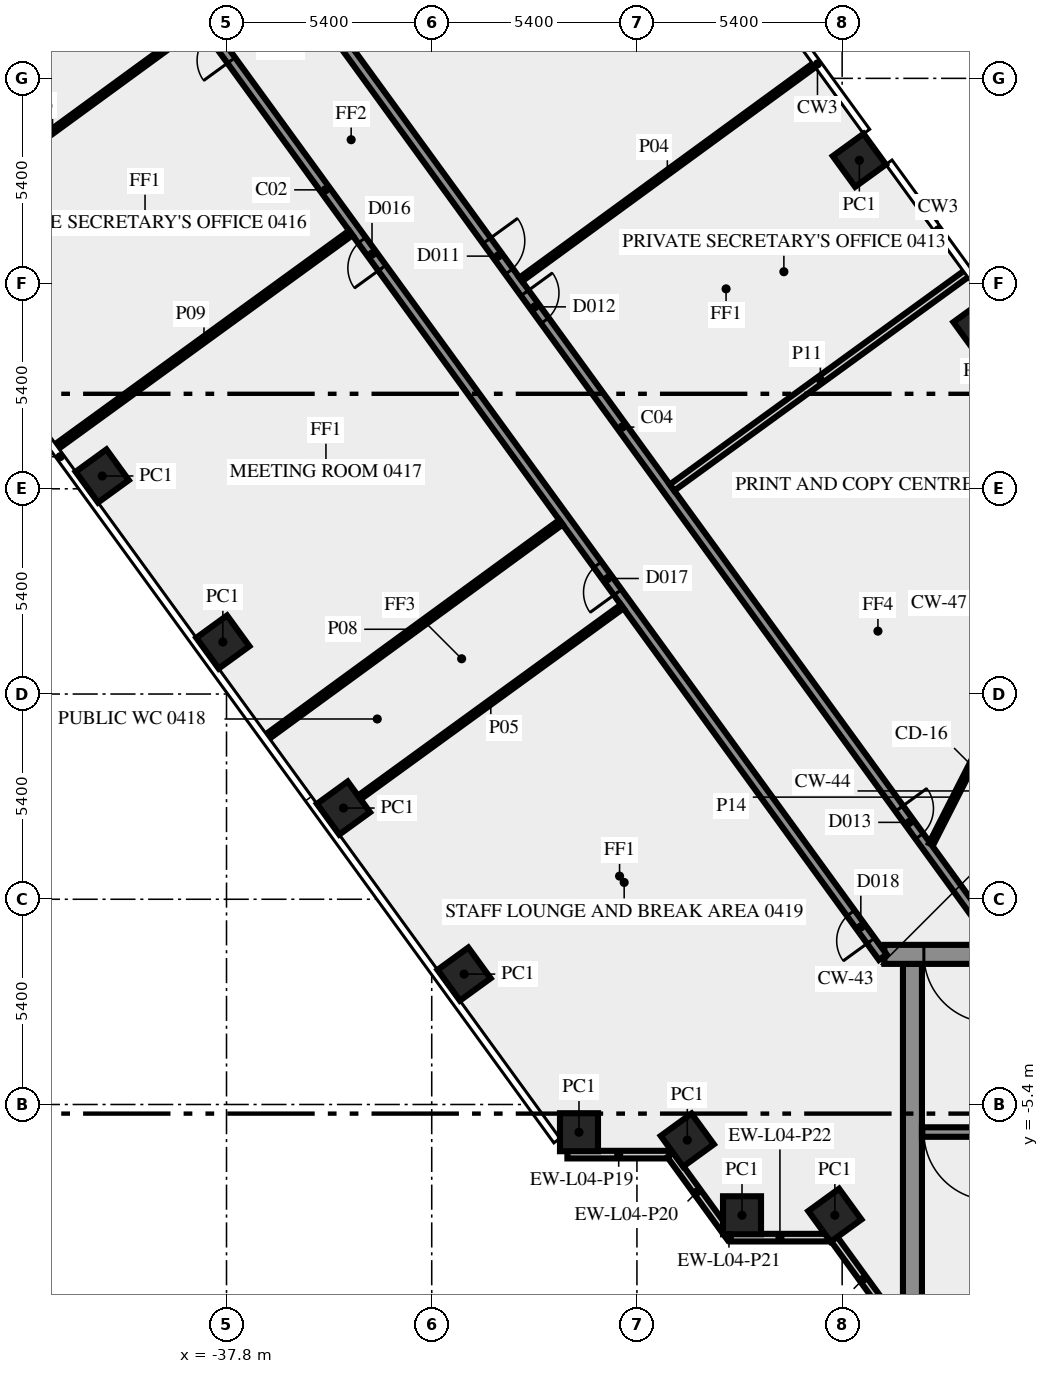
"""IFC4 building model, lengths in metres.
Left out: names, types, materials, properties, quantities, classifications, styles, units other than length and angle.
Written with IfcOpenShell. Run it as: python <this file> out.ifc"""

import sys

from ifc_helpers import new_model, si_unit, direction, frame, frame_2d, origin, origin_2d, place, context, subcontext, project, spatial, rectangle, extrude, element, fill, save


model = new_model("IFC4")
c1 = context("Model", 3, precision=1e-05, world=origin(), true_north=direction((0.0, 1.0)))
c2 = subcontext(c1, "Body", "Model", "MODEL_VIEW")
j1 = project(units=[si_unit("LENGTHUNIT", "METRE"), si_unit("PLANEANGLEUNIT", "RADIAN")], contexts=[c1])
p1 = place(None, origin())
s1 = spatial("IfcSite", under=j1, at=p1, CompositionType="ELEMENT")
p2 = place(p1, origin())
s2 = spatial("IfcBuilding", under=s1, at=p2, CompositionType="ELEMENT")
p3 = place(p2, frame((0.0, 0.0, 20.5)))
s3 = spatial("IfcBuildingStorey", under=s2, at=p3, CompositionType="ELEMENT", Elevation=20.5)
for number, where, z_axis, x_axis in (
    (1, (-17.974, 15.075, 0.0), (0.0, 0.0, 1.0), (-0.588, 0.809, 0.0)),
    (2, (-21.147, 19.444, 0.0), (0.0, 0.0, 1.0), (-0.588, 0.809, 0.0)),
    (3, (-41.07, 11.137, 0.0), (0.0, 0.0, 1.0), (0.588, -0.809, 0.0)),
    (4, (-37.896, 6.769, 0.0), (0.0, 0.0, 1.0), (0.588, -0.809, 0.0)),
    (5, (-34.722, 2.4, 0.0), (0.0, 0.0, 1.0), (0.588, -0.809, 0.0)),
    (6, (-31.548, -1.969, 0.0), (0.0, 0.0, 1.0), (0.588, -0.809, 0.0)),
    (7, (-28.525, -6.13, 0.0), (0.0, 0.0, 1.0), (1.0, 0.0, 0.0)),
    (8, (-25.674, -6.337, 0.0), (0.0, 0.0, 1.0), (0.588, -0.809, 0.0)),
    (9, (-24.235, -8.315, 0.0), (0.0, 0.0, 1.0), (1.0, 0.0, 0.0)),
    (10, (-21.792, -8.315, 0.0), (0.0, 0.0, 1.0), (0.588, -0.809, 0.0)),
):
    element("IfcColumn", number, at=place(p3, frame(where, z_axis=z_axis, x_axis=x_axis)), inside=s3, PredefinedType="COLUMN", context=c2, shape_type="SweptSolid", body=[
        extrude(rectangle(XDim=1.0, YDim=1.0, at=origin_2d()), origin(), (0.0, 0.0, 1.0), 3.9),
    ])
p4 = place(p3, frame((-28.83, -6.719, 0.0), z_axis=(0.0, 0.0, 1.0), x_axis=(1.0, 0.0, 0.0)))
e11 = element("IfcWall", 11, at=p4, inside=s3, PredefinedType="SOLIDWALL", context=c2, shape_type="SweptSolid", body=[
    extrude(rectangle(XDim=2.7, YDim=0.2, at=frame_2d((1.35, 0.0))), origin(), (0.0, 0.0, 1.0), 3.9),
])
p5 = place(p3, frame((-26.12, -6.724, 0.0), z_axis=(0.0, 0.0, 1.0), x_axis=(0.587706476352, -0.809074222587, 0.0)))
e12 = element("IfcWall", 12, at=p5, inside=s3, PredefinedType="SOLIDWALL", context=c2, shape_type="SweptSolid", body=[
    extrude(rectangle(XDim=2.403, YDim=0.2, at=frame_2d((1.202, 0.0))), origin(), (0.0, 0.0, 1.0), 3.9),
])
p6 = place(p3, frame((-24.624, -8.784, 0.0), z_axis=(0.0, 0.0, 1.0), x_axis=(0.586760218966, -0.809760733451, 0.0)))
e13 = element("IfcWall", 13, at=p6, inside=s3, PredefinedType="SOLIDWALL", context=c2, shape_type="SweptSolid", body=[
    extrude(rectangle(XDim=0.154, YDim=0.2, at=frame_2d((0.077, 0.0))), origin(), (0.0, 0.0, 1.0), 3.9),
])
p7 = place(p3, frame((-24.531, -8.904, 0.0), z_axis=(0.0, 0.0, 1.0), x_axis=(1.0, 0.0, 0.0)))
e14 = element("IfcWall", 14, at=p7, inside=s3, PredefinedType="SOLIDWALL", context=c2, shape_type="SweptSolid", body=[
    extrude(rectangle(XDim=2.587, YDim=0.2, at=frame_2d((1.294, 0.0))), origin(), (0.0, 0.0, 1.0), 3.9),
])
p8 = place(p3, frame((-21.833, -8.909, 0.0), z_axis=(0.0, 0.0, 1.0), x_axis=(0.587766567315, -0.809030569476, 0.0)))
e15 = element("IfcWall", 15, at=p8, inside=s3, PredefinedType="SOLIDWALL", context=c2, shape_type="SweptSolid", body=[
    extrude(rectangle(XDim=2.688, YDim=0.2, at=frame_2d((1.344, 0.0))), origin(), (0.0, 0.0, 1.0), 3.9),
])
p9 = place(p3, frame((-19.75, -10.5, 0.0), z_axis=(0.0, 0.0, 1.0), x_axis=(0.0, 1.0, 0.0)))
e16 = element("IfcWall", 16, at=p9, inside=s3, PredefinedType="SHEAR", context=c2, shape_type="SweptSolid", body=[
    extrude(rectangle(XDim=8.8, YDim=0.5, at=frame_2d((4.4, 0.0))), origin(), (0.0, 0.0, 1.0), 3.9),
])
p10 = place(p3, frame((-11.45, -6.125, 0.0), z_axis=(0.0, 0.0, 1.0), x_axis=(-1.0, 0.0, 0.0)))
e17 = element("IfcWall", 17, at=p10, inside=s3, PredefinedType="SHEAR", context=c2, shape_type="SweptSolid", body=[
    extrude(rectangle(XDim=8.05, YDim=0.25, at=frame_2d((4.025, 0.0))), origin(), (0.0, 0.0, 1.0), 3.9),
])
p11 = place(p10, frame((6.2, 0.0, 0.0)))
e18 = element("IfcOpeningElement", 18, at=p11, cuts=e17, PredefinedType="OPENING", context=c2, shape_type="SweptSolid", body=[
    extrude(rectangle(XDim=1.8, YDim=2.1, at=frame_2d((0.9, 1.05))), frame((0.0, 0.135, 0.0), z_axis=(0.0, -1.0, 0.0), x_axis=(1.0, 0.0, 0.0)), (0.0, 0.0, 1.0), 0.27),
])
p12 = place(p3, frame((20.49, -1.45, 0.0), z_axis=(0.0, 0.0, 1.0), x_axis=(-1.0, 0.0, 0.0)))
e19 = element("IfcWall", 19, at=p12, inside=s3, PredefinedType="SHEAR", context=c2, shape_type="SweptSolid", body=[
    extrude(rectangle(XDim=40.98, YDim=0.5, at=frame_2d((20.49, 0.0))), origin(), (0.0, 0.0, 1.0), 3.9),
])
p13 = place(p12, frame((38.14, 0.0, 0.0)))
e20 = element("IfcOpeningElement", 20, at=p13, cuts=e19, PredefinedType="OPENING", context=c2, shape_type="SweptSolid", body=[
    extrude(rectangle(XDim=1.8, YDim=2.1, at=frame_2d((0.9, 1.05))), frame((0.0, 0.26, 0.0), z_axis=(0.0, -1.0, 0.0), x_axis=(1.0, 0.0, 0.0)), (0.0, 0.0, 1.0), 0.52),
])
p14 = place(p12, frame((36.728, 0.0, 0.0)))
e21 = element("IfcOpeningElement", 21, at=p14, cuts=e19, PredefinedType="OPENING", context=c2, shape_type="SweptSolid", body=[
    extrude(rectangle(XDim=0.8, YDim=2.1, at=frame_2d((0.4, 1.05))), frame((0.0, 0.26, 0.0), z_axis=(0.0, -1.0, 0.0), x_axis=(1.0, 0.0, 0.0)), (0.0, 0.0, 1.0), 0.52),
])
p15 = place(p12, frame((35.153, 0.0, 0.0)))
e22 = element("IfcOpeningElement", 22, at=p15, cuts=e19, PredefinedType="OPENING", context=c2, shape_type="SweptSolid", body=[
    extrude(rectangle(XDim=0.8, YDim=2.1, at=frame_2d((0.4, 1.05))), frame((0.0, 0.26, 0.0), z_axis=(0.0, -1.0, 0.0), x_axis=(1.0, 0.0, 0.0)), (0.0, 0.0, 1.0), 0.52),
])
p16 = place(p12, frame((32.94, 0.0, 0.0)))
e23 = element("IfcOpeningElement", 23, at=p16, cuts=e19, PredefinedType="OPENING", context=c2, shape_type="SweptSolid", body=[
    extrude(rectangle(XDim=0.9, YDim=2.1, at=frame_2d((0.45, 1.05))), frame((0.0, 0.26, 0.0), z_axis=(0.0, -1.0, 0.0), x_axis=(1.0, 0.0, 0.0)), (0.0, 0.0, 1.0), 0.52),
])
p17 = place(p12, frame((19.59, 0.0, 0.0)))
e24 = element("IfcOpeningElement", 24, at=p17, cuts=e19, PredefinedType="OPENING", context=c2, shape_type="SweptSolid", body=[
    extrude(rectangle(XDim=2.0, YDim=2.1, at=frame_2d((1.0, 1.05))), frame((0.0, 0.26, 0.0), z_axis=(0.0, -1.0, 0.0), x_axis=(1.0, 0.0, 0.0)), (0.0, 0.0, 1.0), 0.52),
])
p18 = place(p12, frame((7.14, 0.0, 0.0)))
e25 = element("IfcOpeningElement", 25, at=p18, cuts=e19, PredefinedType="OPENING", context=c2, shape_type="SweptSolid", body=[
    extrude(rectangle(XDim=0.9, YDim=2.1, at=frame_2d((0.45, 1.05))), frame((0.0, 0.26, 0.0), z_axis=(0.0, -1.0, 0.0), x_axis=(1.0, 0.0, 0.0)), (0.0, 0.0, 1.0), 0.52),
])
p19 = place(p12, frame((4.19, 0.0, 0.0)))
e26 = element("IfcOpeningElement", 26, at=p19, cuts=e19, PredefinedType="OPENING", context=c2, shape_type="SweptSolid", body=[
    extrude(rectangle(XDim=0.9, YDim=2.1, at=frame_2d((0.45, 1.05))), frame((0.0, 0.26, 0.0), z_axis=(0.0, -1.0, 0.0), x_axis=(1.0, 0.0, 0.0)), (0.0, 0.0, 1.0), 0.52),
])
p20 = place(p12, frame((1.04, 0.0, 0.0)))
e27 = element("IfcOpeningElement", 27, at=p20, cuts=e19, PredefinedType="OPENING", context=c2, shape_type="SweptSolid", body=[
    extrude(rectangle(XDim=1.8, YDim=2.1, at=frame_2d((0.9, 1.05))), frame((0.0, 0.26, 0.0), z_axis=(0.0, -1.0, 0.0), x_axis=(1.0, 0.0, 0.0)), (0.0, 0.0, 1.0), 0.52),
])
p21 = place(p3, frame((-20.531, -1.523, 0.0), z_axis=(0.0, 0.0, 1.0), x_axis=(-0.587784522481, 0.809017524614, 0.0)))
e28 = element("IfcWall", 28, at=p21, inside=s3, PredefinedType="SOLIDWALL", context=c2, shape_type="SweptSolid", body=[
    extrude(rectangle(XDim=49.912, YDim=0.25, at=frame_2d((24.956, 0.0))), origin(), (0.0, 0.0, 1.0), 3.9),
])
p22 = place(p21, frame((30.765, 0.0, 0.0)))
e29 = element("IfcOpeningElement", 29, at=p22, cuts=e28, PredefinedType="OPENING", context=c2, shape_type="SweptSolid", body=[
    extrude(rectangle(XDim=0.9, YDim=2.1, at=frame_2d((0.45, 1.05))), frame((0.0, 0.135, 0.0), z_axis=(0.0, -1.0, 0.0), x_axis=(1.0, 0.0, 0.0)), (0.0, 0.0, 1.0), 0.27),
])
p23 = place(p21, frame((0.533, 0.0, 0.0)))
e30 = element("IfcOpeningElement", 30, at=p23, cuts=e28, PredefinedType="OPENING", context=c2, shape_type="SweptSolid", body=[
    extrude(rectangle(XDim=0.9, YDim=2.1, at=frame_2d((0.45, 1.05))), frame((0.0, 0.135, 0.0), z_axis=(0.0, -1.0, 0.0), x_axis=(1.0, 0.0, 0.0)), (0.0, 0.0, 1.0), 0.27),
])
p24 = place(p21, frame((22.416, 0.0, 0.0)))
e31 = element("IfcOpeningElement", 31, at=p24, cuts=e28, PredefinedType="OPENING", context=c2, shape_type="SweptSolid", body=[
    extrude(rectangle(XDim=0.9, YDim=2.1, at=frame_2d((0.45, 1.05))), frame((0.0, 0.135, 0.0), z_axis=(0.0, -1.0, 0.0), x_axis=(1.0, 0.0, 0.0)), (0.0, 0.0, 1.0), 0.27),
])
p25 = place(p21, frame((11.866, 0.0, 0.0)))
e32 = element("IfcOpeningElement", 32, at=p25, cuts=e28, PredefinedType="OPENING", context=c2, shape_type="SweptSolid", body=[
    extrude(rectangle(XDim=0.9, YDim=2.1, at=frame_2d((0.45, 1.05))), frame((0.0, 0.135, 0.0), z_axis=(0.0, -1.0, 0.0), x_axis=(1.0, 0.0, 0.0)), (0.0, 0.0, 1.0), 0.27),
])
p26 = place(p21, frame((29.166, 0.0, 0.0)))
e33 = element("IfcOpeningElement", 33, at=p26, cuts=e28, PredefinedType="OPENING", context=c2, shape_type="SweptSolid", body=[
    extrude(rectangle(XDim=0.9, YDim=2.1, at=frame_2d((0.45, 1.05))), frame((0.0, 0.135, 0.0), z_axis=(0.0, -1.0, 0.0), x_axis=(1.0, 0.0, 0.0)), (0.0, 0.0, 1.0), 0.27),
])
p27 = place(p3, frame((-37.232, 25.972, 0.0), z_axis=(0.0, 0.0, 1.0), x_axis=(0.587786323093, -0.809016216391, 0.0)))
e34 = element("IfcWall", 34, at=p27, inside=s3, PredefinedType="SOLIDWALL", context=c2, shape_type="SweptSolid", body=[
    extrude(rectangle(XDim=33.493, YDim=0.25, at=frame_2d((16.747, 0.0))), origin(), (0.0, 0.0, 1.0), 3.9),
])
p28 = place(p27, frame((10.685, 0.0, 0.0)))
e35 = element("IfcOpeningElement", 35, at=p28, cuts=e34, PredefinedType="OPENING", context=c2, shape_type="SweptSolid", body=[
    extrude(rectangle(XDim=1.0, YDim=2.1, at=frame_2d((0.5, 1.05))), frame((0.0, 0.135, 0.0), z_axis=(0.0, -1.0, 0.0), x_axis=(1.0, 0.0, 0.0)), (0.0, 0.0, 1.0), 0.27),
])
p29 = place(p27, frame((29.152, 0.0, 0.0)))
e36 = element("IfcOpeningElement", 36, at=p29, cuts=e34, PredefinedType="OPENING", context=c2, shape_type="SweptSolid", body=[
    extrude(rectangle(XDim=0.9, YDim=2.1, at=frame_2d((0.45, 1.05))), frame((0.0, 0.135, 0.0), z_axis=(0.0, -1.0, 0.0), x_axis=(1.0, 0.0, 0.0)), (0.0, 0.0, 1.0), 0.27),
])
p30 = place(p27, frame((12.385, 0.0, 0.0)))
e37 = element("IfcOpeningElement", 37, at=p30, cuts=e34, PredefinedType="OPENING", context=c2, shape_type="SweptSolid", body=[
    extrude(rectangle(XDim=0.9, YDim=2.1, at=frame_2d((0.45, 1.05))), frame((0.0, 0.135, 0.0), z_axis=(0.0, -1.0, 0.0), x_axis=(1.0, 0.0, 0.0)), (0.0, 0.0, 1.0), 0.27),
])
p31 = place(p3, frame((-46.234, 17.394, 0.0), z_axis=(0.0, 0.0, 1.0), x_axis=(0.807606997933, 0.589721067023, 0.0)))
e38 = element("IfcWall", 38, at=p31, inside=s3, PredefinedType="PARTITIONING", context=c2, shape_type="SweptSolid", body=[
    extrude(rectangle(XDim=9.55, YDim=0.12, at=frame_2d((4.775, 0.0))), origin(), (0.0, 0.0, 1.0), 2.9),
])
p32 = place(p3, frame((-30.056, 16.308, 0.0), z_axis=(0.0, 0.0, 1.0), x_axis=(0.807610282865, 0.589716568371, 0.0)))
e39 = element("IfcWall", 39, at=p32, inside=s3, PredefinedType="PARTITIONING", context=c2, shape_type="SweptSolid", body=[
    extrude(rectangle(XDim=9.55, YDim=0.12, at=frame_2d((4.775, 0.0))), origin(), (0.0, 0.0, 1.0), 2.9),
])
p33 = place(p3, frame((-27.389, 7.703, 0.0), z_axis=(0.0, 0.0, 1.0), x_axis=(-0.809054740315, -0.587733295955, 0.0)))
e40 = element("IfcWall", 40, at=p33, inside=s3, PredefinedType="PARTITIONING", context=c2, shape_type="SweptSolid", body=[
    extrude(rectangle(XDim=8.545, YDim=0.12, at=frame_2d((4.272, 0.0))), origin(), (0.0, 0.0, 1.0), 3.9),
])
p34 = place(p3, frame((-36.712, 4.288, 0.0), z_axis=(0.0, 0.0, 1.0), x_axis=(0.807606997933, 0.589721067023, 0.0)))
e41 = element("IfcWall", 41, at=p34, inside=s3, PredefinedType="PARTITIONING", context=c2, shape_type="SweptSolid", body=[
    extrude(rectangle(XDim=9.55, YDim=0.15, at=frame_2d((4.775, 0.0))), origin(), (0.0, 0.0, 1.0), 2.9),
])
p35 = place(p3, frame((-34.53, 17.533, 0.0), z_axis=(0.0, 0.0, 1.0), x_axis=(-0.809036661777, -0.587758181483, 0.0)))
e42 = element("IfcWall", 42, at=p35, inside=s3, PredefinedType="PARTITIONING", context=c2, shape_type="SweptSolid", body=[
    extrude(rectangle(XDim=9.55, YDim=0.15, at=frame_2d((4.775, 0.0))), origin(), (0.0, 0.0, 1.0), 2.9),
])
p36 = place(p3, frame((-18.269, 16.504, 0.0), z_axis=(0.0, 0.0, 1.0), x_axis=(-0.809047748514, -0.587742920522, 0.0)))
e43 = element("IfcWall", 43, at=p36, inside=s3, PredefinedType="SOLIDWALL", context=c2, shape_type="SweptSolid", body=[
    extrude(rectangle(XDim=9.651, YDim=0.2, at=frame_2d((4.825, 0.0))), origin(), (0.0, 0.0, 1.0), 2.9),
])
p37 = place(p3, frame((-19.261, 1.45, 0.0), z_axis=(0.0, 0.0, 1.0), x_axis=(0.453950796792, 0.891026752736, 0.0)))
e44 = element("IfcWall", 44, at=p37, inside=s3, PredefinedType="PARTITIONING", context=c2, shape_type="SweptSolid", body=[
    extrude(rectangle(XDim=2.778, YDim=0.12, at=frame_2d((1.389, 0.0))), origin(), (0.0, 0.0, 1.0), 3.9),
])
p38 = place(p11, origin())
e45 = element("IfcDoor", 45, at=p38, inside=s3, OperationType="DOUBLE_DOOR_SINGLE_SWING", PredefinedType="DOOR", context=c2, shape_type="SweptSolid", body=[
    extrude(rectangle(XDim=1.8, YDim=2.1, at=frame_2d((0.9, 1.05))), frame((0.0, 0.025, 0.0), z_axis=(0.0, -1.0, 0.0), x_axis=(1.0, 0.0, 0.0)), (0.0, 0.0, 1.0), 0.05),
])
fill(e18, e45)
p39 = place(p13, origin())
e46 = element("IfcDoor", 46, at=p39, inside=s3, OperationType="DOUBLE_DOOR_SINGLE_SWING", PredefinedType="DOOR", context=c2, shape_type="SweptSolid", body=[
    extrude(rectangle(XDim=1.8, YDim=2.1, at=frame_2d((0.9, 1.05))), frame((0.0, 0.025, 0.0), z_axis=(0.0, -1.0, 0.0), x_axis=(1.0, 0.0, 0.0)), (0.0, 0.0, 1.0), 0.05),
])
fill(e20, e46)
p40 = place(p28, origin())
e47 = element("IfcDoor", 47, at=p40, inside=s3, OperationType="SINGLE_SWING_RIGHT", PredefinedType="DOOR", context=c2, shape_type="SweptSolid", body=[
    extrude(rectangle(XDim=1.0, YDim=2.1, at=frame_2d((0.5, 1.05))), frame((0.0, 0.025, 0.0), z_axis=(0.0, -1.0, 0.0), x_axis=(1.0, 0.0, 0.0)), (0.0, 0.0, 1.0), 0.05),
])
fill(e35, e47)
p41 = place(p23, origin())
e48 = element("IfcDoor", 48, at=p41, inside=s3, OperationType="SINGLE_SWING_LEFT", PredefinedType="DOOR", context=c2, shape_type="SweptSolid", body=[
    extrude(rectangle(XDim=0.9, YDim=2.1, at=frame_2d((0.45, 1.05))), frame((0.0, 0.025, 0.0), z_axis=(0.0, -1.0, 0.0), x_axis=(1.0, 0.0, 0.0)), (0.0, 0.0, 1.0), 0.05),
])
fill(e30, e48)
p42 = place(p24, origin())
e49 = element("IfcDoor", 49, at=p42, inside=s3, OperationType="SINGLE_SWING_RIGHT", PredefinedType="DOOR", context=c2, shape_type="SweptSolid", body=[
    extrude(rectangle(XDim=0.9, YDim=2.1, at=frame_2d((0.45, 1.05))), frame((0.0, 0.025, 0.0), z_axis=(0.0, -1.0, 0.0), x_axis=(1.0, 0.0, 0.0)), (0.0, 0.0, 1.0), 0.05),
])
fill(e31, e49)
p43 = place(p29, origin())
e50 = element("IfcDoor", 50, at=p43, inside=s3, OperationType="SINGLE_SWING_RIGHT", PredefinedType="DOOR", context=c2, shape_type="SweptSolid", body=[
    extrude(rectangle(XDim=0.9, YDim=2.1, at=frame_2d((0.45, 1.05))), frame((0.0, 0.025, 0.0), z_axis=(0.0, -1.0, 0.0), x_axis=(1.0, 0.0, 0.0)), (0.0, 0.0, 1.0), 0.05),
])
fill(e36, e50)
p44 = place(p25, origin())
e51 = element("IfcDoor", 51, at=p44, inside=s3, OperationType="SINGLE_SWING_LEFT", PredefinedType="DOOR", context=c2, shape_type="SweptSolid", body=[
    extrude(rectangle(XDim=0.9, YDim=2.1, at=frame_2d((0.45, 1.05))), frame((0.0, 0.025, 0.0), z_axis=(0.0, -1.0, 0.0), x_axis=(1.0, 0.0, 0.0)), (0.0, 0.0, 1.0), 0.05),
])
fill(e32, e51)
p45 = place(p30, origin())
e52 = element("IfcDoor", 52, at=p45, inside=s3, OperationType="SINGLE_SWING_LEFT", PredefinedType="DOOR", context=c2, shape_type="SweptSolid", body=[
    extrude(rectangle(XDim=0.9, YDim=2.1, at=frame_2d((0.45, 1.05))), frame((0.0, 0.025, 0.0), z_axis=(0.0, -1.0, 0.0), x_axis=(1.0, 0.0, 0.0)), (0.0, 0.0, 1.0), 0.05),
])
fill(e37, e52)
p46 = place(p26, origin())
e53 = element("IfcDoor", 53, at=p46, inside=s3, OperationType="SINGLE_SWING_RIGHT", PredefinedType="DOOR", context=c2, shape_type="SweptSolid", body=[
    extrude(rectangle(XDim=0.9, YDim=2.1, at=frame_2d((0.45, 1.05))), frame((0.0, 0.025, 0.0), z_axis=(0.0, -1.0, 0.0), x_axis=(1.0, 0.0, 0.0)), (0.0, 0.0, 1.0), 0.05),
])
fill(e33, e53)
save(model, sys.argv[1])
